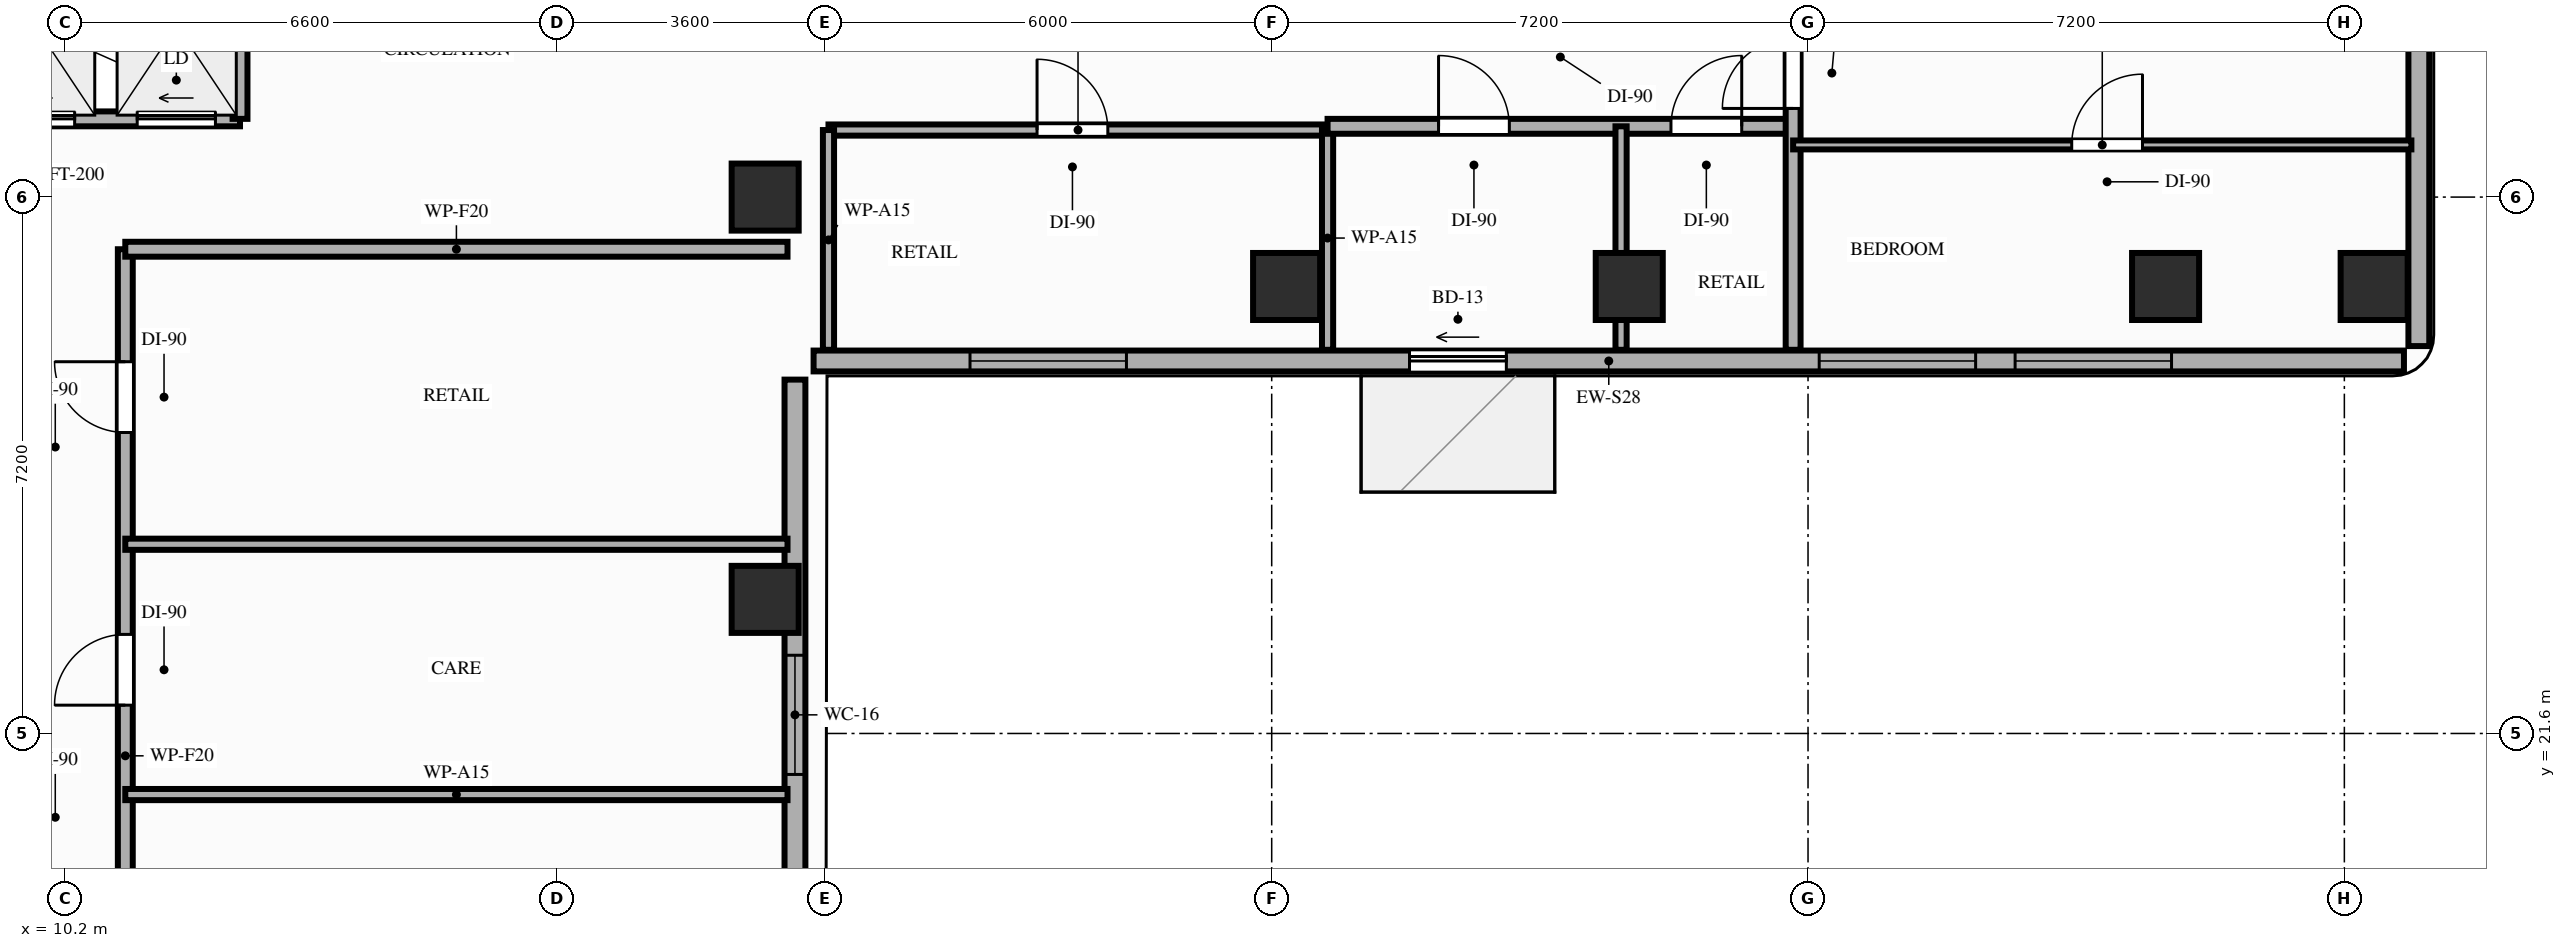
"""IFC4 building model, lengths in metres.
Left out: names, types, materials, properties, quantities, classifications, styles, units other than length and angle.
Written with IfcOpenShell. Run it as: python <this file> out.ifc"""

import sys

from ifc_helpers import new_model, si_unit, direction, frame, frame_2d, origin, origin_2d, place, context, subcontext, project, spatial, rectangle, extrude, element, fill, save


model = new_model("IFC4")
c1 = context("Model", 3, precision=1e-05, world=origin(), true_north=direction((0.0, 1.0)))
c2 = subcontext(c1, "Body", "Model", "MODEL_VIEW")
j1 = project(units=[si_unit("LENGTHUNIT", "METRE"), si_unit("PLANEANGLEUNIT", "RADIAN")], contexts=[c1])
p1 = place(None, origin())
s1 = spatial("IfcSite", under=j1, at=p1, CompositionType="ELEMENT")
p2 = place(p1, origin())
s2 = spatial("IfcBuilding", under=s1, at=p2, CompositionType="ELEMENT")
p3 = place(p2, frame((0.0, 0.0, 195.2)))
s3 = spatial("IfcBuildingStorey", under=s2, at=p3, CompositionType="ELEMENT", Elevation=195.2)
for number, where, z_axis, x_axis in (
    (1, (19.6, 23.4, 0.0), (0.0, 0.0, 1.0), (1.0, 0.0, 0.0)),
    (2, (19.6, 28.8, 0.0), (0.0, 0.0, 1.0), (1.0, 0.0, 0.0)),
    (3, (26.6, 27.6, 0.0), (0.0, 0.0, 1.0), (1.0, 0.0, 0.0)),
    (4, (31.2, 27.6, 0.0), (0.0, 0.0, 1.0), (1.0, 0.0, 0.0)),
    (5, (38.4, 27.6, 0.0), (0.0, 0.0, 1.0), (1.0, 0.0, 0.0)),
    (6, (41.2, 27.6, 0.0), (0.0, 0.0, 1.0), (1.0, 0.0, 0.0)),
):
    element("IfcColumn", number, at=place(p3, frame(where, z_axis=z_axis, x_axis=x_axis)), inside=s3, PredefinedType="COLUMN", context=c2, shape_type="SweptSolid", body=[
        extrude(rectangle(XDim=0.9, YDim=0.9, at=origin_2d()), origin(), (0.0, 0.0, 1.0), 3.2),
    ])
p4 = place(p3, frame((20.0, 8.8, 0.0), z_axis=(0.0, 0.0, 1.0), x_axis=(0.0, 1.0, 0.0)))
e7 = element("IfcWall", 7, at=p4, inside=s3, PredefinedType="STANDARD", context=c2, shape_type="SweptSolid", body=[
    extrude(rectangle(XDim=17.55, YDim=0.28, at=frame_2d((8.775, 0.0))), origin(), (0.0, 0.0, 1.0), 2.51),
])
p5 = place(p4, frame((4.58, 0.0, 0.85)))
e8 = element("IfcOpeningElement", 8, at=p5, cuts=e7, PredefinedType="OPENING", context=c2, shape_type="SweptSolid", body=[
    extrude(rectangle(XDim=0.8, YDim=1.41, at=frame_2d((0.4, 0.705))), frame((0.0, 0.15, 0.0), z_axis=(0.0, -1.0, 0.0), x_axis=(1.0, 0.0, 0.0)), (0.0, 0.0, 1.0), 0.3),
])
p6 = place(p4, frame((12.25, 0.0, 0.85)))
e9 = element("IfcOpeningElement", 9, at=p6, cuts=e7, PredefinedType="OPENING", context=c2, shape_type="SweptSolid", body=[
    extrude(rectangle(XDim=1.6, YDim=1.41, at=frame_2d((0.8, 0.705))), frame((0.0, 0.15, 0.0), z_axis=(0.0, -1.0, 0.0), x_axis=(1.0, 0.0, 0.0)), (0.0, 0.0, 1.0), 0.3),
])
p7 = place(p4, frame((5.95, 0.0, 0.85)))
e10 = element("IfcOpeningElement", 10, at=p7, cuts=e7, PredefinedType="OPENING", context=c2, shape_type="SweptSolid", body=[
    extrude(rectangle(XDim=1.1, YDim=1.41, at=frame_2d((0.55, 0.705))), frame((0.0, 0.15, 0.0), z_axis=(0.0, -1.0, 0.0), x_axis=(1.0, 0.0, 0.0)), (0.0, 0.0, 1.0), 0.3),
])
p8 = place(p3, frame((20.25, 26.6, 0.0), z_axis=(0.0, 0.0, 1.0), x_axis=(1.0, 0.0, 0.0)))
e11 = element("IfcWall", 11, at=p8, inside=s3, PredefinedType="STANDARD", context=c2, shape_type="SweptSolid", body=[
    extrude(rectangle(XDim=21.35, YDim=0.28, at=frame_2d((10.675, 0.0))), origin(), (0.0, 0.0, 1.0), 2.71),
])
p9 = place(p8, frame((8.0, 0.0, 0.0)))
e12 = element("IfcOpeningElement", 12, at=p9, cuts=e11, PredefinedType="OPENING", context=c2, shape_type="SweptSolid", body=[
    extrude(rectangle(XDim=1.3, YDim=2.08, at=frame_2d((0.65, 1.04))), frame((0.0, 0.15, 0.0), z_axis=(0.0, -1.0, 0.0), x_axis=(1.0, 0.0, 0.0)), (0.0, 0.0, 1.0), 0.3),
])
p10 = place(p8, frame((16.13, 0.0, 0.85)))
e13 = element("IfcOpeningElement", 13, at=p10, cuts=e11, PredefinedType="OPENING", context=c2, shape_type="SweptSolid", body=[
    extrude(rectangle(XDim=2.1, YDim=1.61, at=frame_2d((1.05, 0.805))), frame((0.0, 0.15, 0.0), z_axis=(0.0, -1.0, 0.0), x_axis=(1.0, 0.0, 0.0)), (0.0, 0.0, 1.0), 0.3),
])
p11 = place(p8, frame((2.1, 0.0, 0.85)))
e14 = element("IfcOpeningElement", 14, at=p11, cuts=e11, PredefinedType="OPENING", context=c2, shape_type="SweptSolid", body=[
    extrude(rectangle(XDim=2.1, YDim=1.61, at=frame_2d((1.05, 0.805))), frame((0.0, 0.15, 0.0), z_axis=(0.0, -1.0, 0.0), x_axis=(1.0, 0.0, 0.0)), (0.0, 0.0, 1.0), 0.3),
])
p12 = place(p8, frame((13.5, 0.0, 0.85)))
e15 = element("IfcOpeningElement", 15, at=p12, cuts=e11, PredefinedType="OPENING", context=c2, shape_type="SweptSolid", body=[
    extrude(rectangle(XDim=2.1, YDim=1.61, at=frame_2d((1.05, 0.805))), frame((0.0, 0.15, 0.0), z_axis=(0.0, -1.0, 0.0), x_axis=(1.0, 0.0, 0.0)), (0.0, 0.0, 1.0), 0.3),
])
p13 = place(p3, frame((41.8, 26.8, 0.0), z_axis=(0.0, 0.0, 1.0), x_axis=(0.0, 1.0, 0.0)))
e16 = element("IfcWall", 16, at=p13, inside=s3, PredefinedType="STANDARD", context=c2, shape_type="SweptSolid", body=[
    extrude(rectangle(XDim=15.35, YDim=0.28, at=frame_2d((7.675, 0.0))), origin(), (0.0, 0.0, 1.0), 3.02),
])
p14 = place(p13, frame((6.35, 0.0, 0.85)))
e17 = element("IfcOpeningElement", 17, at=p14, cuts=e16, PredefinedType="OPENING", context=c2, shape_type="SweptSolid", body=[
    extrude(rectangle(XDim=2.1, YDim=1.8, at=frame_2d((1.05, 0.9))), frame((0.0, 0.15, 0.0), z_axis=(0.0, -1.0, 0.0), x_axis=(1.0, 0.0, 0.0)), (0.0, 0.0, 1.0), 0.3),
])
p15 = place(p3, frame((7.0, 29.85, 0.0), z_axis=(0.0, 0.0, 1.0), x_axis=(1.0, 0.0, 0.0)))
e18 = element("IfcWall", 18, at=p15, inside=s3, PredefinedType="MOVABLE", context=c2, shape_type="SweptSolid", body=[
    extrude(rectangle(XDim=5.55, YDim=0.2, at=frame_2d((2.775, 0.0))), origin(), (0.0, 0.0, 1.0), 3.02),
])
p16 = place(p15, frame((0.38, 0.0, 0.0)))
e19 = element("IfcOpeningElement", 19, at=p16, cuts=e18, PredefinedType="OPENING", context=c2, shape_type="SweptSolid", body=[
    extrude(rectangle(XDim=1.05, YDim=2.15, at=frame_2d((0.525, 1.075))), frame((0.0, 0.11, 0.0), z_axis=(0.0, -1.0, 0.0), x_axis=(1.0, 0.0, 0.0)), (0.0, 0.0, 1.0), 0.22),
])
p17 = place(p15, frame((2.28, 0.0, 0.0)))
e20 = element("IfcOpeningElement", 20, at=p17, cuts=e18, PredefinedType="OPENING", context=c2, shape_type="SweptSolid", body=[
    extrude(rectangle(XDim=1.05, YDim=2.15, at=frame_2d((0.525, 1.075))), frame((0.0, 0.11, 0.0), z_axis=(0.0, -1.0, 0.0), x_axis=(1.0, 0.0, 0.0)), (0.0, 0.0, 1.0), 0.22),
])
p18 = place(p15, frame((4.17, 0.0, 0.0)))
e21 = element("IfcOpeningElement", 21, at=p18, cuts=e18, PredefinedType="OPENING", context=c2, shape_type="SweptSolid", body=[
    extrude(rectangle(XDim=1.05, YDim=2.15, at=frame_2d((0.525, 1.075))), frame((0.0, 0.11, 0.0), z_axis=(0.0, -1.0, 0.0), x_axis=(1.0, 0.0, 0.0)), (0.0, 0.0, 1.0), 0.22),
])
p19 = place(p3, frame((12.55, 29.85, 0.0), z_axis=(0.0, 0.0, 1.0), x_axis=(0.0, 1.0, 0.0)))
e22 = element("IfcWall", 22, at=p19, inside=s3, PredefinedType="MOVABLE", context=c2, shape_type="SweptSolid", body=[
    extrude(rectangle(XDim=2.5, YDim=0.2, at=frame_2d((1.25, 0.0))), origin(), (0.0, 0.0, 1.0), 3.02),
])
p20 = place(p3, frame((11.01, 14.5, 0.0), z_axis=(0.0, 0.0, 1.0), x_axis=(0.0, 1.0, 0.0)))
e23 = element("IfcWall", 23, at=p20, inside=s3, PredefinedType="PARTITIONING", context=c2, shape_type="SweptSolid", body=[
    extrude(rectangle(XDim=13.6, YDim=0.2, at=frame_2d((6.8, 0.0))), origin(), (0.0, 0.0, 1.0), 2.51),
])
p21 = place(p20, frame((0.33, 0.0, 0.0)))
e24 = element("IfcOpeningElement", 24, at=p21, cuts=e23, PredefinedType="OPENING", context=c2, shape_type="SweptSolid", body=[
    extrude(rectangle(XDim=0.95, YDim=2.1, at=frame_2d((0.475, 1.05))), frame((0.0, 0.11, 0.0), z_axis=(0.0, -1.0, 0.0), x_axis=(1.0, 0.0, 0.0)), (0.0, 0.0, 1.0), 0.22),
])
p22 = place(p20, frame((3.46, 0.0, 0.0)))
e25 = element("IfcOpeningElement", 25, at=p22, cuts=e23, PredefinedType="OPENING", context=c2, shape_type="SweptSolid", body=[
    extrude(rectangle(XDim=0.95, YDim=2.15, at=frame_2d((0.475, 1.075))), frame((0.0, 0.11, 0.0), z_axis=(0.0, -1.0, 0.0), x_axis=(1.0, 0.0, 0.0)), (0.0, 0.0, 1.0), 0.22),
])
p23 = place(p20, frame((7.48, 0.0, 0.0)))
e26 = element("IfcOpeningElement", 26, at=p23, cuts=e23, PredefinedType="OPENING", context=c2, shape_type="SweptSolid", body=[
    extrude(rectangle(XDim=0.95, YDim=2.15, at=frame_2d((0.475, 1.075))), frame((0.0, 0.11, 0.0), z_axis=(0.0, -1.0, 0.0), x_axis=(1.0, 0.0, 0.0)), (0.0, 0.0, 1.0), 0.22),
])
p24 = place(p20, frame((11.14, 0.0, 0.0)))
e27 = element("IfcOpeningElement", 27, at=p24, cuts=e23, PredefinedType="OPENING", context=c2, shape_type="SweptSolid", body=[
    extrude(rectangle(XDim=0.95, YDim=2.15, at=frame_2d((0.475, 1.075))), frame((0.0, 0.11, 0.0), z_axis=(0.0, -1.0, 0.0), x_axis=(1.0, 0.0, 0.0)), (0.0, 0.0, 1.0), 0.22),
])
p25 = place(p3, frame((11.01, 28.1, 0.0), z_axis=(0.0, 0.0, 1.0), x_axis=(1.0, 0.0, 0.0)))
e28 = element("IfcWall", 28, at=p25, inside=s3, PredefinedType="PARTITIONING", context=c2, shape_type="SweptSolid", body=[
    extrude(rectangle(XDim=8.89, YDim=0.2, at=frame_2d((4.445, 0.0))), origin(), (0.0, 0.0, 1.0), 2.51),
])
p26 = place(p3, frame((20.45, 29.7, 0.0), z_axis=(0.0, 0.0, 1.0), x_axis=(1.0, 0.0, 0.0)))
e29 = element("IfcWall", 29, at=p26, inside=s3, PredefinedType="PARTITIONING", context=c2, shape_type="SweptSolid", body=[
    extrude(rectangle(XDim=6.7, YDim=0.15, at=frame_2d((3.35, 0.0))), origin(), (0.0, 0.0, 1.0), 3.02),
])
p27 = place(p26, frame((2.8, 0.0, 0.0)))
e30 = element("IfcOpeningElement", 30, at=p27, cuts=e29, PredefinedType="OPENING", context=c2, shape_type="SweptSolid", body=[
    extrude(rectangle(XDim=0.95, YDim=2.15, at=frame_2d((0.475, 1.075))), frame((0.0, 0.085, 0.0), z_axis=(0.0, -1.0, 0.0), x_axis=(1.0, 0.0, 0.0)), (0.0, 0.0, 1.0), 0.17),
])
p28 = place(p3, frame((20.45, 26.75, 0.0), z_axis=(0.0, 0.0, 1.0), x_axis=(0.0, 1.0, 0.0)))
e31 = element("IfcWall", 31, at=p28, inside=s3, PredefinedType="PARTITIONING", context=c2, shape_type="SweptSolid", body=[
    extrude(rectangle(XDim=2.95, YDim=0.15, at=frame_2d((1.475, 0.0))), origin(), (0.0, 0.0, 1.0), 2.51),
])
p29 = place(p3, frame((27.15, 26.75, 0.0), z_axis=(0.0, 0.0, 1.0), x_axis=(0.0, 1.0, 0.0)))
e32 = element("IfcWall", 32, at=p29, inside=s3, PredefinedType="PARTITIONING", context=c2, shape_type="SweptSolid", body=[
    extrude(rectangle(XDim=3.0, YDim=0.15, at=frame_2d((1.5, 0.0))), origin(), (0.0, 0.0, 1.0), 2.51),
])
for number, where, z_axis, x_axis in (
    (33, (11.01, 20.78, 0.0), (0.0, 0.0, 1.0), (1.0, 0.0, 0.0)),
    (34, (11.01, 24.14, 0.0), (0.0, 0.0, 1.0), (1.0, 0.0, 0.0)),
):
    element("IfcWall", number, at=place(p3, frame(where, z_axis=z_axis, x_axis=x_axis)), inside=s3, PredefinedType="PARTITIONING", context=c2, shape_type="SweptSolid", body=[
        extrude(rectangle(XDim=8.89, YDim=0.15, at=frame_2d((4.445, 0.0))), origin(), (0.0, 0.0, 1.0), 2.51),
    ])
p30 = place(p3, frame((27.15, 29.75, 0.0), z_axis=(0.0, 0.0, 1.0), x_axis=(1.0, 0.0, 0.0)))
e35 = element("IfcWall", 35, at=p30, inside=s3, PredefinedType="PARTITIONING", context=c2, shape_type="SweptSolid", body=[
    extrude(rectangle(XDim=6.25, YDim=0.2, at=frame_2d((3.125, 0.0))), origin(), (0.0, 0.0, 1.0), 2.51),
])
p31 = place(p30, frame((1.49, 0.0, 0.0)))
e36 = element("IfcOpeningElement", 36, at=p31, cuts=e35, PredefinedType="OPENING", context=c2, shape_type="SweptSolid", body=[
    extrude(rectangle(XDim=0.95, YDim=2.15, at=frame_2d((0.475, 1.075))), frame((0.0, 0.11, 0.0), z_axis=(0.0, -1.0, 0.0), x_axis=(1.0, 0.0, 0.0)), (0.0, 0.0, 1.0), 0.22),
])
p32 = place(p30, frame((4.61, 0.0, 0.0)))
e37 = element("IfcOpeningElement", 37, at=p32, cuts=e35, PredefinedType="OPENING", context=c2, shape_type="SweptSolid", body=[
    extrude(rectangle(XDim=0.95, YDim=2.15, at=frame_2d((0.475, 1.075))), frame((0.0, 0.11, 0.0), z_axis=(0.0, -1.0, 0.0), x_axis=(1.0, 0.0, 0.0)), (0.0, 0.0, 1.0), 0.22),
])
p33 = place(p3, frame((33.4, 26.75, 0.0), z_axis=(0.0, 0.0, 1.0), x_axis=(0.0, 1.0, 0.0)))
e38 = element("IfcWall", 38, at=p33, inside=s3, PredefinedType="PARTITIONING", context=c2, shape_type="SweptSolid", body=[
    extrude(rectangle(XDim=15.45, YDim=0.2, at=frame_2d((7.725, 0.0))), origin(), (0.0, 0.0, 1.0), 2.51),
])
p34 = place(p33, frame((3.24, 0.0, 0.0)))
e39 = element("IfcOpeningElement", 39, at=p34, cuts=e38, PredefinedType="OPENING", context=c2, shape_type="SweptSolid", body=[
    extrude(rectangle(XDim=0.95, YDim=2.15, at=frame_2d((0.475, 1.075))), frame((0.0, 0.11, 0.0), z_axis=(0.0, -1.0, 0.0), x_axis=(1.0, 0.0, 0.0)), (0.0, 0.0, 1.0), 0.22),
])
p35 = place(p3, frame((33.4, 29.5, 0.0), z_axis=(0.0, 0.0, 1.0), x_axis=(1.0, 0.0, 0.0)))
e40 = element("IfcWall", 40, at=p35, inside=s3, PredefinedType="PARTITIONING", context=c2, shape_type="SweptSolid", body=[
    extrude(rectangle(XDim=8.3, YDim=0.12, at=frame_2d((4.15, 0.0))), origin(), (0.0, 0.0, 1.0), 2.51),
])
p36 = place(p35, frame((3.74, 0.0, 0.0)))
e41 = element("IfcOpeningElement", 41, at=p36, cuts=e40, PredefinedType="OPENING", context=c2, shape_type="SweptSolid", body=[
    extrude(rectangle(XDim=0.95, YDim=2.15, at=frame_2d((0.475, 1.075))), frame((0.0, 0.07, 0.0), z_axis=(0.0, -1.0, 0.0), x_axis=(1.0, 0.0, 0.0)), (0.0, 0.0, 1.0), 0.14),
])
p37 = place(p3, frame((31.09, 26.75, 0.0), z_axis=(0.0, 0.0, 1.0), x_axis=(0.0, 1.0, 0.0)))
e42 = element("IfcWall", 42, at=p37, inside=s3, PredefinedType="PARTITIONING", context=c2, shape_type="SweptSolid", body=[
    extrude(rectangle(XDim=3.0, YDim=0.15, at=frame_2d((1.5, 0.0))), origin(), (0.0, 0.0, 1.0), 2.51),
])
p38 = place(p9, origin())
e43 = element("IfcDoor", 43, at=p38, inside=s3, OperationType="SLIDING_TO_LEFT", PredefinedType="DOOR", context=c2, shape_type="SweptSolid", body=[
    extrude(rectangle(XDim=1.3, YDim=2.08, at=frame_2d((0.65, 1.04))), frame((0.0, 0.025, 0.0), z_axis=(0.0, -1.0, 0.0), x_axis=(1.0, 0.0, 0.0)), (0.0, 0.0, 1.0), 0.05),
])
fill(e12, e43)
p39 = place(p6, origin())
e44 = element("IfcWindow", 44, at=p39, inside=s3, PartitioningType="SINGLE_PANEL", PredefinedType="WINDOW", context=c2, shape_type="SweptSolid", body=[
    extrude(rectangle(XDim=1.6, YDim=1.41, at=frame_2d((0.8, 0.705))), frame((0.0, 0.03, 0.0), z_axis=(0.0, -1.0, 0.0), x_axis=(1.0, 0.0, 0.0)), (0.0, 0.0, 1.0), 0.06),
])
fill(e9, e44)
p40 = place(p10, origin())
e45 = element("IfcWindow", 45, at=p40, inside=s3, PartitioningType="SINGLE_PANEL", PredefinedType="WINDOW", context=c2, shape_type="SweptSolid", body=[
    extrude(rectangle(XDim=2.1, YDim=1.61, at=frame_2d((1.05, 0.805))), frame((0.0, 0.03, 0.0), z_axis=(0.0, -1.0, 0.0), x_axis=(1.0, 0.0, 0.0)), (0.0, 0.0, 1.0), 0.06),
])
fill(e13, e45)
p41 = place(p11, origin())
e46 = element("IfcWindow", 46, at=p41, inside=s3, PartitioningType="SINGLE_PANEL", PredefinedType="WINDOW", context=c2, shape_type="SweptSolid", body=[
    extrude(rectangle(XDim=2.1, YDim=1.61, at=frame_2d((1.05, 0.805))), frame((0.0, 0.03, 0.0), z_axis=(0.0, -1.0, 0.0), x_axis=(1.0, 0.0, 0.0)), (0.0, 0.0, 1.0), 0.06),
])
fill(e14, e46)
p42 = place(p12, origin())
e47 = element("IfcWindow", 47, at=p42, inside=s3, PartitioningType="SINGLE_PANEL", PredefinedType="WINDOW", context=c2, shape_type="SweptSolid", body=[
    extrude(rectangle(XDim=2.1, YDim=1.61, at=frame_2d((1.05, 0.805))), frame((0.0, 0.03, 0.0), z_axis=(0.0, -1.0, 0.0), x_axis=(1.0, 0.0, 0.0)), (0.0, 0.0, 1.0), 0.06),
])
fill(e15, e47)
p43 = place(p17, origin())
e48 = element("IfcDoor", 48, at=p43, inside=s3, OperationType="SLIDING_TO_LEFT", PredefinedType="DOOR", context=c2, shape_type="SweptSolid", body=[
    extrude(rectangle(XDim=1.05, YDim=2.15, at=frame_2d((0.525, 1.075))), frame((0.0, 0.025, 0.0), z_axis=(0.0, -1.0, 0.0), x_axis=(1.0, 0.0, 0.0)), (0.0, 0.0, 1.0), 0.05),
])
fill(e20, e48)
p44 = place(p18, origin())
e49 = element("IfcDoor", 49, at=p44, inside=s3, OperationType="SLIDING_TO_LEFT", PredefinedType="DOOR", context=c2, shape_type="SweptSolid", body=[
    extrude(rectangle(XDim=1.05, YDim=2.15, at=frame_2d((0.525, 1.075))), frame((0.0, 0.025, 0.0), z_axis=(0.0, -1.0, 0.0), x_axis=(1.0, 0.0, 0.0)), (0.0, 0.0, 1.0), 0.05),
])
fill(e21, e49)
p45 = place(p27, origin())
e50 = element("IfcDoor", 50, at=p45, inside=s3, OperationType="SINGLE_SWING_LEFT", PredefinedType="DOOR", context=c2, shape_type="SweptSolid", body=[
    extrude(rectangle(XDim=0.95, YDim=2.15, at=frame_2d((0.475, 1.075))), frame((0.0, 0.025, 0.0), z_axis=(0.0, -1.0, 0.0), x_axis=(1.0, 0.0, 0.0)), (0.0, 0.0, 1.0), 0.05),
])
fill(e30, e50)
p46 = place(p23, origin())
e51 = element("IfcDoor", 51, at=p46, inside=s3, OperationType="SINGLE_SWING_LEFT", PredefinedType="DOOR", context=c2, shape_type="SweptSolid", body=[
    extrude(rectangle(XDim=0.95, YDim=2.15, at=frame_2d((0.475, 1.075))), frame((0.0, 0.025, 0.0), z_axis=(0.0, -1.0, 0.0), x_axis=(1.0, 0.0, 0.0)), (0.0, 0.0, 1.0), 0.05),
])
fill(e26, e51)
p47 = place(p24, origin())
e52 = element("IfcDoor", 52, at=p47, inside=s3, OperationType="SINGLE_SWING_RIGHT", PredefinedType="DOOR", context=c2, shape_type="SweptSolid", body=[
    extrude(rectangle(XDim=0.95, YDim=2.15, at=frame_2d((0.475, 1.075))), frame((0.0, 0.025, 0.0), z_axis=(0.0, -1.0, 0.0), x_axis=(1.0, 0.0, 0.0)), (0.0, 0.0, 1.0), 0.05),
])
fill(e27, e52)
p48 = place(p34, origin())
e53 = element("IfcDoor", 53, at=p48, inside=s3, OperationType="SINGLE_SWING_LEFT", PredefinedType="DOOR", context=c2, shape_type="SweptSolid", body=[
    extrude(rectangle(XDim=0.95, YDim=2.15, at=frame_2d((0.475, 1.075))), frame((0.0, 0.025, 0.0), z_axis=(0.0, -1.0, 0.0), x_axis=(1.0, 0.0, 0.0)), (0.0, 0.0, 1.0), 0.05),
])
fill(e39, e53)
p49 = place(p36, origin())
e54 = element("IfcDoor", 54, at=p49, inside=s3, OperationType="SINGLE_SWING_RIGHT", PredefinedType="DOOR", context=c2, shape_type="SweptSolid", body=[
    extrude(rectangle(XDim=0.95, YDim=2.15, at=frame_2d((0.475, 1.075))), frame((0.0, 0.025, 0.0), z_axis=(0.0, -1.0, 0.0), x_axis=(1.0, 0.0, 0.0)), (0.0, 0.0, 1.0), 0.05),
])
fill(e41, e54)
p50 = place(p31, origin())
e55 = element("IfcDoor", 55, at=p50, inside=s3, OperationType="SINGLE_SWING_LEFT", PredefinedType="DOOR", context=c2, shape_type="SweptSolid", body=[
    extrude(rectangle(XDim=0.95, YDim=2.15, at=frame_2d((0.475, 1.075))), frame((0.0, 0.025, 0.0), z_axis=(0.0, -1.0, 0.0), x_axis=(1.0, 0.0, 0.0)), (0.0, 0.0, 1.0), 0.05),
])
fill(e36, e55)
p51 = place(p32, origin())
e56 = element("IfcDoor", 56, at=p51, inside=s3, OperationType="SINGLE_SWING_RIGHT", PredefinedType="DOOR", context=c2, shape_type="SweptSolid", body=[
    extrude(rectangle(XDim=0.95, YDim=2.15, at=frame_2d((0.475, 1.075))), frame((0.0, 0.025, 0.0), z_axis=(0.0, -1.0, 0.0), x_axis=(1.0, 0.0, 0.0)), (0.0, 0.0, 1.0), 0.05),
])
fill(e37, e56)
save(model, sys.argv[1])
